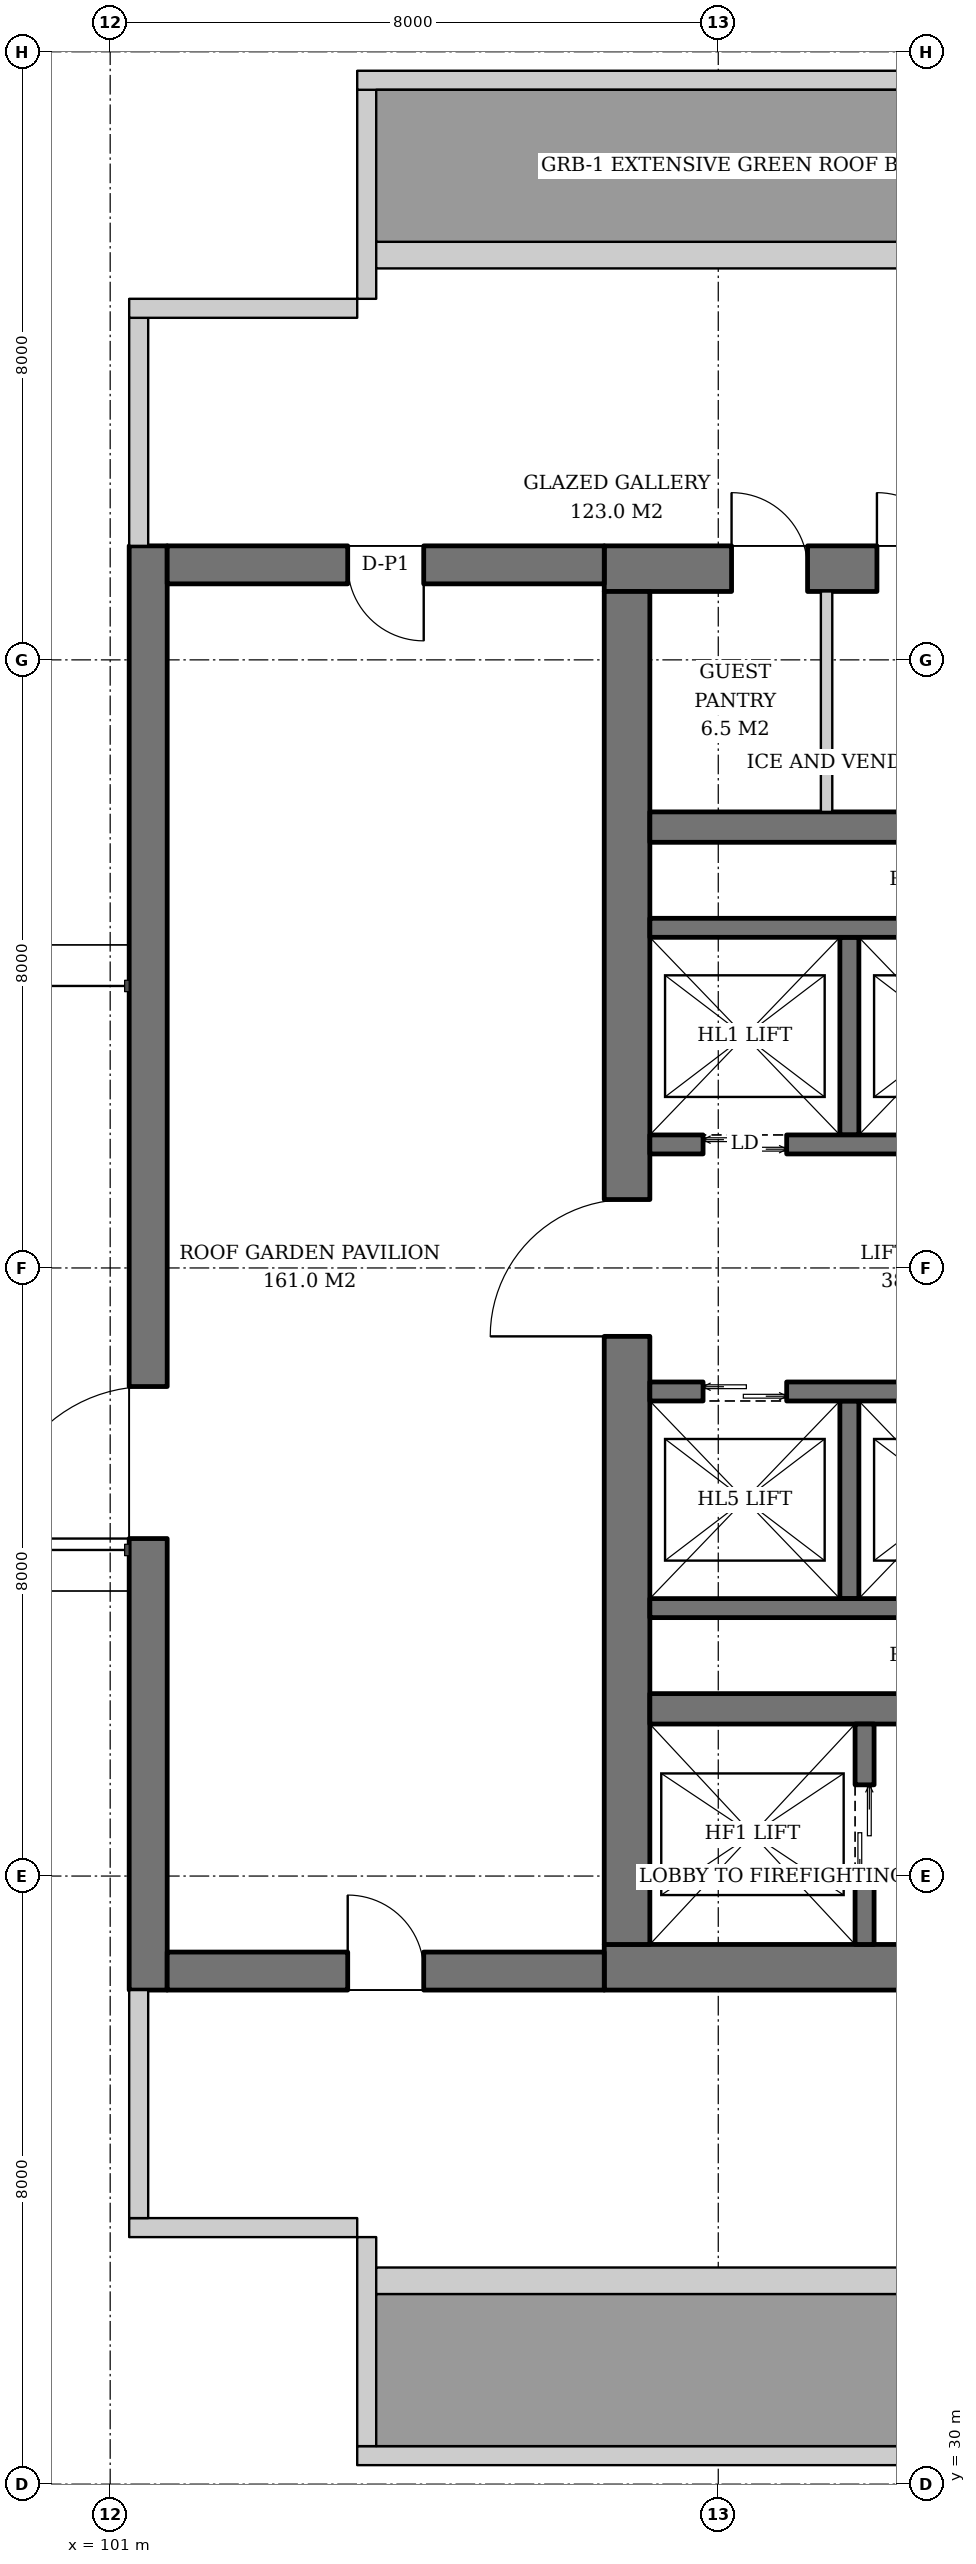
"""IFC4 building model, lengths in metres.
Left out: names, types, materials, properties, quantities, classifications, styles, units other than length and angle.
Written with IfcOpenShell. Run it as: python <this file> out.ifc"""

import sys

from ifc_helpers import new_model, si_unit, direction, frame, frame_2d, origin, place, context, subcontext, project, spatial, rectangle, extrude, element, fill, save


model = new_model("IFC4")
c1 = context("Model", 3, precision=1e-05, world=origin(), true_north=direction((0.0, 1.0)))
c2 = subcontext(c1, "Body", "Model", "MODEL_VIEW")
j1 = project(units=[si_unit("LENGTHUNIT", "METRE"), si_unit("PLANEANGLEUNIT", "RADIAN")], contexts=[c1])
p1 = place(None, origin())
s1 = spatial("IfcSite", under=j1, at=p1, CompositionType="ELEMENT")
p2 = place(p1, origin())
s2 = spatial("IfcBuilding", under=s1, at=p2, CompositionType="ELEMENT")
p3 = place(p2, frame((0.0, 0.0, 131.2)))
s3 = spatial("IfcBuildingStorey", under=s2, at=p3, CompositionType="ELEMENT", Elevation=131.2)
p4 = place(p3, frame((107.5, 36.8, 0.0), z_axis=(0.0, 0.0, 1.0), x_axis=(1.0, 0.0, 0.0)))
e1 = element("IfcWall", 1, at=p4, inside=s3, PredefinedType="SHEAR", context=c2, shape_type="SweptSolid", body=[
    extrude(rectangle(XDim=19.0, YDim=0.6, at=frame_2d((9.5, 0.0))), origin(), (0.0, 0.0, 1.0), 3.8),
])
p5 = place(p4, frame((3.9, 0.0, 0.0)))
e2 = element("IfcOpeningElement", 2, at=p5, cuts=e1, PredefinedType="OPENING", context=c2, shape_type="SweptSolid", body=[
    extrude(rectangle(XDim=1.0, YDim=2.1, at=frame_2d((0.5, 1.05))), frame((0.0, 0.31, 0.0), z_axis=(0.0, -1.0, 0.0), x_axis=(1.0, 0.0, 0.0)), (0.0, 0.0, 1.0), 0.62),
])
p6 = place(p4, frame((15.615, 0.0, 0.0)))
e3 = element("IfcOpeningElement", 3, at=p6, cuts=e1, PredefinedType="OPENING", context=c2, shape_type="SweptSolid", body=[
    extrude(rectangle(XDim=1.0, YDim=2.1, at=frame_2d((0.5, 1.05))), frame((0.0, 0.31, 0.0), z_axis=(0.0, -1.0, 0.0), x_axis=(1.0, 0.0, 0.0)), (0.0, 0.0, 1.0), 0.62),
])
p7 = place(p3, frame((107.5, 55.2, 0.0), z_axis=(0.0, 0.0, 1.0), x_axis=(1.0, 0.0, 0.0)))
e4 = element("IfcWall", 4, at=p7, inside=s3, PredefinedType="SHEAR", context=c2, shape_type="SweptSolid", body=[
    extrude(rectangle(XDim=19.0, YDim=0.6, at=frame_2d((9.5, 0.0))), origin(), (0.0, 0.0, 1.0), 3.8),
])
p8 = place(p7, frame((14.14, 0.0, 0.0)))
e5 = element("IfcOpeningElement", 5, at=p8, cuts=e4, PredefinedType="OPENING", context=c2, shape_type="SweptSolid", body=[
    extrude(rectangle(XDim=1.0, YDim=2.1, at=frame_2d((0.5, 1.05))), frame((0.0, 0.31, 0.0), z_axis=(0.0, -1.0, 0.0), x_axis=(1.0, 0.0, 0.0)), (0.0, 0.0, 1.0), 0.62),
])
p9 = place(p7, frame((1.675, 0.0, 0.0)))
e6 = element("IfcOpeningElement", 6, at=p9, cuts=e4, PredefinedType="OPENING", context=c2, shape_type="SweptSolid", body=[
    extrude(rectangle(XDim=1.0, YDim=2.1, at=frame_2d((0.5, 1.05))), frame((0.0, 0.31, 0.0), z_axis=(0.0, -1.0, 0.0), x_axis=(1.0, 0.0, 0.0)), (0.0, 0.0, 1.0), 0.62),
])
p10 = place(p7, frame((3.587, 0.0, 0.0)))
e7 = element("IfcOpeningElement", 7, at=p10, cuts=e4, PredefinedType="OPENING", context=c2, shape_type="SweptSolid", body=[
    extrude(rectangle(XDim=1.0, YDim=2.1, at=frame_2d((0.5, 1.05))), frame((0.0, 0.31, 0.0), z_axis=(0.0, -1.0, 0.0), x_axis=(1.0, 0.0, 0.0)), (0.0, 0.0, 1.0), 0.62),
])
p11 = place(p3, frame((107.8, 37.1, 0.0), z_axis=(0.0, 0.0, 1.0), x_axis=(0.0, 1.0, 0.0)))
e8 = element("IfcWall", 8, at=p11, inside=s3, PredefinedType="SHEAR", context=c2, shape_type="SweptSolid", body=[
    extrude(rectangle(XDim=17.8, YDim=0.6, at=frame_2d((8.9, 0.0))), origin(), (0.0, 0.0, 1.0), 3.8),
])
p12 = place(p11, frame((8.0, 0.0, 0.0)))
e9 = element("IfcOpeningElement", 9, at=p12, cuts=e8, PredefinedType="OPENING", context=c2, shape_type="SweptSolid", body=[
    extrude(rectangle(XDim=1.8, YDim=2.4, at=frame_2d((0.9, 1.2))), frame((0.0, 0.31, 0.0), z_axis=(0.0, -1.0, 0.0), x_axis=(1.0, 0.0, 0.0)), (0.0, 0.0, 1.0), 0.62),
])
for number, where, z_axis, x_axis in (
    (10, (108.1, 40.2, 0.0), (0.0, 0.0, 1.0), (1.0, 0.0, 0.0)),
    (11, (108.1, 51.8, 0.0), (0.0, 0.0, 1.0), (1.0, 0.0, 0.0)),
):
    element("IfcWall", number, at=place(p3, frame(where, z_axis=z_axis, x_axis=x_axis)), inside=s3, PredefinedType="SHEAR", context=c2, shape_type="SweptSolid", body=[
        extrude(rectangle(XDim=17.8, YDim=0.4, at=frame_2d((8.9, 0.0))), origin(), (0.0, 0.0, 1.0), 3.8),
    ])
p13 = place(p3, frame((101.5, 36.5, 0.0), z_axis=(0.0, 0.0, 1.0), x_axis=(0.0, 1.0, 0.0)))
e12 = element("IfcWall", 12, at=p13, inside=s3, PredefinedType="SOLIDWALL", context=c2, shape_type="SweptSolid", body=[
    extrude(rectangle(XDim=19.0, YDim=0.5, at=frame_2d((9.5, 0.0))), origin(), (0.0, 0.0, 1.0), 3.6),
])
p14 = place(p13, frame((5.94, 0.0, 0.0)))
e13 = element("IfcOpeningElement", 13, at=p14, cuts=e12, PredefinedType="OPENING", context=c2, shape_type="SweptSolid", body=[
    extrude(rectangle(XDim=2.0, YDim=2.4, at=frame_2d((1.0, 1.2))), frame((0.0, 0.26, 0.0), z_axis=(0.0, -1.0, 0.0), x_axis=(1.0, 0.0, 0.0)), (0.0, 0.0, 1.0), 0.52),
])
p15 = place(p3, frame((101.75, 36.75, 0.0), z_axis=(0.0, 0.0, 1.0), x_axis=(1.0, 0.0, 0.0)))
e14 = element("IfcWall", 14, at=p15, inside=s3, PredefinedType="SOLIDWALL", context=c2, shape_type="SweptSolid", body=[
    extrude(rectangle(XDim=5.75, YDim=0.5, at=frame_2d((2.875, 0.0))), origin(), (0.0, 0.0, 1.0), 3.6),
])
p16 = place(p15, frame((2.375, 0.0, 0.0)))
e15 = element("IfcOpeningElement", 15, at=p16, cuts=e14, PredefinedType="OPENING", context=c2, shape_type="SweptSolid", body=[
    extrude(rectangle(XDim=1.0, YDim=2.4, at=frame_2d((0.5, 1.2))), frame((0.0, 0.26, 0.0), z_axis=(0.0, -1.0, 0.0), x_axis=(1.0, 0.0, 0.0)), (0.0, 0.0, 1.0), 0.52),
])
p17 = place(p3, frame((107.5, 55.25, 0.0), z_axis=(0.0, 0.0, 1.0), x_axis=(-1.0, 0.0, 0.0)))
e16 = element("IfcWall", 16, at=p17, inside=s3, PredefinedType="SOLIDWALL", context=c2, shape_type="SweptSolid", body=[
    extrude(rectangle(XDim=5.75, YDim=0.5, at=frame_2d((2.875, 0.0))), origin(), (0.0, 0.0, 1.0), 3.6),
])
p18 = place(p17, frame((2.375, 0.0, 0.0)))
e17 = element("IfcOpeningElement", 17, at=p18, cuts=e16, PredefinedType="OPENING", context=c2, shape_type="SweptSolid", body=[
    extrude(rectangle(XDim=1.0, YDim=2.4, at=frame_2d((0.5, 1.2))), frame((0.0, 0.26, 0.0), z_axis=(0.0, -1.0, 0.0), x_axis=(1.0, 0.0, 0.0)), (0.0, 0.0, 1.0), 0.52),
])
for number, where, z_axis, x_axis in (
    (18, (101.25, 33.375, 0.0), (0.0, 0.0, 1.0), (1.0, 0.0, 0.0)),
    (19, (101.375, 33.5, 0.0), (0.0, 0.0, 1.0), (0.0, 1.0, 0.0)),
    (20, (101.375, 55.5, 0.0), (0.0, 0.0, 1.0), (0.0, 1.0, 0.0)),
    (21, (101.25, 58.625, 0.0), (0.0, 0.0, 1.0), (1.0, 0.0, 0.0)),
):
    element("IfcWall", number, at=place(p3, frame(where, z_axis=z_axis, x_axis=x_axis)), inside=s3, PredefinedType="PARAPET", context=c2, shape_type="SweptSolid", body=[
        extrude(rectangle(XDim=3.0, YDim=0.25, at=frame_2d((1.5, 0.0))), origin(), (0.0, 0.0, 1.0), 1.1),
    ])
p19 = place(p3, frame((104.25, 30.375, 0.0), z_axis=(0.0, 0.0, 1.0), x_axis=(1.0, 0.0, 0.0)))
e22 = element("IfcWall", 22, at=p19, inside=s3, PredefinedType="PARAPET", context=c2, shape_type="SweptSolid", body=[
    extrude(rectangle(XDim=25.5, YDim=0.25, at=frame_2d((12.75, 0.0))), origin(), (0.0, 0.0, 1.0), 1.1),
])
for number, where, z_axis, x_axis in (
    (23, (104.375, 30.5, 0.0), (0.0, 0.0, 1.0), (0.0, 1.0, 0.0)),
    (24, (104.375, 58.75, 0.0), (0.0, 0.0, 1.0), (0.0, 1.0, 0.0)),
):
    element("IfcWall", number, at=place(p3, frame(where, z_axis=z_axis, x_axis=x_axis)), inside=s3, PredefinedType="PARAPET", context=c2, shape_type="SweptSolid", body=[
        extrude(rectangle(XDim=2.75, YDim=0.25, at=frame_2d((1.375, 0.0))), origin(), (0.0, 0.0, 1.0), 1.1),
    ])
p20 = place(p3, frame((104.25, 61.625, 0.0), z_axis=(0.0, 0.0, 1.0), x_axis=(1.0, 0.0, 0.0)))
e25 = element("IfcWall", 25, at=p20, inside=s3, PredefinedType="PARAPET", context=c2, shape_type="SweptSolid", body=[
    extrude(rectangle(XDim=25.5, YDim=0.25, at=frame_2d((12.75, 0.0))), origin(), (0.0, 0.0, 1.0), 1.1),
])
for number, where, z_axis, x_axis in (
    (26, (104.5, 32.675, 0.0), (0.0, 0.0, 1.0), (1.0, 0.0, 0.0)),
    (27, (104.5, 59.325, 0.0), (0.0, 0.0, 1.0), (1.0, 0.0, 0.0)),
):
    element("IfcWall", number, at=place(p3, frame(where, z_axis=z_axis, x_axis=x_axis)), inside=s3, PredefinedType="PARAPET", context=c2, shape_type="SweptSolid", body=[
        extrude(rectangle(XDim=22.0, YDim=0.35, at=frame_2d((11.0, 0.0))), origin(), (0.0, 0.0, 1.0), 1.1),
    ])
p21 = place(p3, frame((110.925, 37.1, 0.0), z_axis=(0.0, 0.0, 1.0), x_axis=(0.0, 1.0, 0.0)))
e28 = element("IfcWall", 28, at=p21, inside=s3, PredefinedType="SHEAR", context=c2, shape_type="SweptSolid", body=[
    extrude(rectangle(XDim=2.9, YDim=0.25, at=frame_2d((1.45, 0.0))), origin(), (0.0, 0.0, 1.0), 3.8),
])
p22 = place(p21, frame((0.8, 0.0, 0.0)))
e29 = element("IfcOpeningElement", 29, at=p22, cuts=e28, PredefinedType="OPENING", context=c2, shape_type="SweptSolid", body=[
    extrude(rectangle(XDim=1.3, YDim=2.2, at=frame_2d((0.65, 1.1))), frame((0.0, 0.135, 0.0), z_axis=(0.0, -1.0, 0.0), x_axis=(1.0, 0.0, 0.0)), (0.0, 0.0, 1.0), 0.27),
])
p23 = place(p3, frame((110.725, 47.75, 0.0), z_axis=(0.0, 0.0, 1.0), x_axis=(0.0, 1.0, 0.0)))
e30 = element("IfcWall", 30, at=p23, inside=s3, PredefinedType="SHEAR", context=c2, shape_type="SweptSolid", body=[
    extrude(rectangle(XDim=2.6, YDim=0.25, at=frame_2d((1.3, 0.0))), origin(), (0.0, 0.0, 1.0), 3.8),
])
p24 = place(p3, frame((108.1, 50.475, 0.0), z_axis=(0.0, 0.0, 1.0), x_axis=(1.0, 0.0, 0.0)))
e31 = element("IfcWall", 31, at=p24, inside=s3, PredefinedType="SHEAR", context=c2, shape_type="SweptSolid", body=[
    extrude(rectangle(XDim=11.0, YDim=0.25, at=frame_2d((5.5, 0.0))), origin(), (0.0, 0.0, 1.0), 3.8),
])
p25 = place(p3, frame((108.1, 47.625, 0.0), z_axis=(0.0, 0.0, 1.0), x_axis=(1.0, 0.0, 0.0)))
e32 = element("IfcWall", 32, at=p25, inside=s3, PredefinedType="SHEAR", context=c2, shape_type="SweptSolid", body=[
    extrude(rectangle(XDim=12.83, YDim=0.25, at=frame_2d((6.415, 0.0))), origin(), (0.0, 0.0, 1.0), 3.8),
])
p26 = place(p25, frame((0.7, 0.0, 0.0)))
e33 = element("IfcOpeningElement", 33, at=p26, cuts=e32, PredefinedType="OPENING", context=c2, shape_type="SweptSolid", body=[
    extrude(rectangle(XDim=1.1, YDim=2.2, at=frame_2d((0.55, 1.1))), frame((0.0, 0.135, 0.0), z_axis=(0.0, -1.0, 0.0), x_axis=(1.0, 0.0, 0.0)), (0.0, 0.0, 1.0), 0.27),
])
p27 = place(p25, frame((3.45, 0.0, 0.0)))
e34 = element("IfcOpeningElement", 34, at=p27, cuts=e32, PredefinedType="OPENING", context=c2, shape_type="SweptSolid", body=[
    extrude(rectangle(XDim=1.1, YDim=2.2, at=frame_2d((0.55, 1.1))), frame((0.0, 0.135, 0.0), z_axis=(0.0, -1.0, 0.0), x_axis=(1.0, 0.0, 0.0)), (0.0, 0.0, 1.0), 0.27),
])
p28 = place(p25, frame((6.2, 0.0, 0.0)))
e35 = element("IfcOpeningElement", 35, at=p28, cuts=e32, PredefinedType="OPENING", context=c2, shape_type="SweptSolid", body=[
    extrude(rectangle(XDim=1.1, YDim=2.2, at=frame_2d((0.55, 1.1))), frame((0.0, 0.135, 0.0), z_axis=(0.0, -1.0, 0.0), x_axis=(1.0, 0.0, 0.0)), (0.0, 0.0, 1.0), 0.27),
])
p29 = place(p25, frame((8.95, 0.0, 0.0)))
e36 = element("IfcOpeningElement", 36, at=p29, cuts=e32, PredefinedType="OPENING", context=c2, shape_type="SweptSolid", body=[
    extrude(rectangle(XDim=1.1, YDim=2.2, at=frame_2d((0.55, 1.1))), frame((0.0, 0.135, 0.0), z_axis=(0.0, -1.0, 0.0), x_axis=(1.0, 0.0, 0.0)), (0.0, 0.0, 1.0), 0.27),
])
p30 = place(p25, frame((11.515, 0.0, 0.0)))
e37 = element("IfcOpeningElement", 37, at=p30, cuts=e32, PredefinedType="OPENING", context=c2, shape_type="SweptSolid", body=[
    extrude(rectangle(XDim=0.8, YDim=2.0, at=frame_2d((0.4, 1.0))), frame((0.0, 0.135, 0.0), z_axis=(0.0, -1.0, 0.0), x_axis=(1.0, 0.0, 0.0)), (0.0, 0.0, 1.0), 0.27),
])
p31 = place(p3, frame((110.725, 44.25, 0.0), z_axis=(0.0, 0.0, 1.0), x_axis=(0.0, -1.0, 0.0)))
e38 = element("IfcWall", 38, at=p31, inside=s3, PredefinedType="SHEAR", context=c2, shape_type="SweptSolid", body=[
    extrude(rectangle(XDim=2.6, YDim=0.25, at=frame_2d((1.3, 0.0))), origin(), (0.0, 0.0, 1.0), 3.8),
])
p32 = place(p3, frame((108.1, 41.525, 0.0), z_axis=(0.0, 0.0, 1.0), x_axis=(1.0, 0.0, 0.0)))
e39 = element("IfcWall", 39, at=p32, inside=s3, PredefinedType="SHEAR", context=c2, shape_type="SweptSolid", body=[
    extrude(rectangle(XDim=11.0, YDim=0.25, at=frame_2d((5.5, 0.0))), origin(), (0.0, 0.0, 1.0), 3.8),
])
p33 = place(p3, frame((108.1, 44.375, 0.0), z_axis=(0.0, 0.0, 1.0), x_axis=(1.0, 0.0, 0.0)))
e40 = element("IfcWall", 40, at=p33, inside=s3, PredefinedType="SHEAR", context=c2, shape_type="SweptSolid", body=[
    extrude(rectangle(XDim=12.83, YDim=0.25, at=frame_2d((6.415, 0.0))), origin(), (0.0, 0.0, 1.0), 3.8),
])
p34 = place(p33, frame((0.7, 0.0, 0.0)))
e41 = element("IfcOpeningElement", 41, at=p34, cuts=e40, PredefinedType="OPENING", context=c2, shape_type="SweptSolid", body=[
    extrude(rectangle(XDim=1.1, YDim=2.2, at=frame_2d((0.55, 1.1))), frame((0.0, 0.135, 0.0), z_axis=(0.0, -1.0, 0.0), x_axis=(1.0, 0.0, 0.0)), (0.0, 0.0, 1.0), 0.27),
])
p35 = place(p33, frame((3.45, 0.0, 0.0)))
e42 = element("IfcOpeningElement", 42, at=p35, cuts=e40, PredefinedType="OPENING", context=c2, shape_type="SweptSolid", body=[
    extrude(rectangle(XDim=1.1, YDim=2.2, at=frame_2d((0.55, 1.1))), frame((0.0, 0.135, 0.0), z_axis=(0.0, -1.0, 0.0), x_axis=(1.0, 0.0, 0.0)), (0.0, 0.0, 1.0), 0.27),
])
p36 = place(p33, frame((6.2, 0.0, 0.0)))
e43 = element("IfcOpeningElement", 43, at=p36, cuts=e40, PredefinedType="OPENING", context=c2, shape_type="SweptSolid", body=[
    extrude(rectangle(XDim=1.1, YDim=2.2, at=frame_2d((0.55, 1.1))), frame((0.0, 0.135, 0.0), z_axis=(0.0, -1.0, 0.0), x_axis=(1.0, 0.0, 0.0)), (0.0, 0.0, 1.0), 0.27),
])
p37 = place(p33, frame((9.0, 0.0, 0.0)))
e44 = element("IfcOpeningElement", 44, at=p37, cuts=e40, PredefinedType="OPENING", context=c2, shape_type="SweptSolid", body=[
    extrude(rectangle(XDim=1.0, YDim=2.1, at=frame_2d((0.5, 1.05))), frame((0.0, 0.135, 0.0), z_axis=(0.0, -1.0, 0.0), x_axis=(1.0, 0.0, 0.0)), (0.0, 0.0, 1.0), 0.27),
])
p38 = place(p33, frame((11.515, 0.0, 0.0)))
e45 = element("IfcOpeningElement", 45, at=p38, cuts=e40, PredefinedType="OPENING", context=c2, shape_type="SweptSolid", body=[
    extrude(rectangle(XDim=0.8, YDim=2.0, at=frame_2d((0.4, 1.0))), frame((0.0, 0.135, 0.0), z_axis=(0.0, -1.0, 0.0), x_axis=(1.0, 0.0, 0.0)), (0.0, 0.0, 1.0), 0.27),
])
p39 = place(p3, frame((110.425, 52.0, 0.0), z_axis=(0.0, 0.0, 1.0), x_axis=(0.0, 1.0, 0.0)))
e46 = element("IfcWall", 46, at=p39, inside=s3, PredefinedType="SOLIDWALL", context=c2, shape_type="SweptSolid", body=[
    extrude(rectangle(XDim=2.9, YDim=0.15, at=frame_2d((1.45, 0.0))), origin(), (0.0, 0.0, 1.0), 3.55),
])
p40 = place(p14, origin())
e47 = element("IfcDoor", 47, at=p40, inside=s3, OperationType="DOUBLE_DOOR_SINGLE_SWING", PredefinedType="DOOR", context=c2, shape_type="SweptSolid", body=[
    extrude(rectangle(XDim=2.0, YDim=2.4, at=frame_2d((1.0, 1.2))), frame((0.0, 0.025, 0.0), z_axis=(0.0, -1.0, 0.0), x_axis=(1.0, 0.0, 0.0)), (0.0, 0.0, 1.0), 0.05),
])
fill(e13, e47)
p41 = place(p16, origin())
e48 = element("IfcDoor", 48, at=p41, inside=s3, OperationType="SINGLE_SWING_LEFT", PredefinedType="DOOR", context=c2, shape_type="SweptSolid", body=[
    extrude(rectangle(XDim=1.0, YDim=2.4, at=frame_2d((0.5, 1.2))), frame((0.0, 0.025, 0.0), z_axis=(0.0, -1.0, 0.0), x_axis=(1.0, 0.0, 0.0)), (0.0, 0.0, 1.0), 0.05),
])
fill(e15, e48)
p42 = place(p18, origin())
e49 = element("IfcDoor", 49, at=p42, inside=s3, OperationType="SINGLE_SWING_LEFT", PredefinedType="DOOR", context=c2, shape_type="SweptSolid", body=[
    extrude(rectangle(XDim=1.0, YDim=2.4, at=frame_2d((0.5, 1.2))), frame((0.0, 0.025, 0.0), z_axis=(0.0, -1.0, 0.0), x_axis=(1.0, 0.0, 0.0)), (0.0, 0.0, 1.0), 0.05),
])
fill(e17, e49)
p43 = place(p22, origin())
e50 = element("IfcDoor", 50, at=p43, inside=s3, OperationType="DOUBLE_DOOR_SLIDING", PredefinedType="DOOR", context=c2, shape_type="SweptSolid", body=[
    extrude(rectangle(XDim=1.3, YDim=2.2, at=frame_2d((0.65, 1.1))), frame((0.0, 0.025, 0.0), z_axis=(0.0, -1.0, 0.0), x_axis=(1.0, 0.0, 0.0)), (0.0, 0.0, 1.0), 0.05),
])
fill(e29, e50)
p44 = place(p26, origin())
e51 = element("IfcDoor", 51, at=p44, inside=s3, OperationType="DOUBLE_DOOR_SLIDING", PredefinedType="DOOR", context=c2, shape_type="SweptSolid", body=[
    extrude(rectangle(XDim=1.1, YDim=2.2, at=frame_2d((0.55, 1.1))), frame((0.0, 0.025, 0.0), z_axis=(0.0, -1.0, 0.0), x_axis=(1.0, 0.0, 0.0)), (0.0, 0.0, 1.0), 0.05),
])
fill(e33, e51)
p45 = place(p34, origin())
e52 = element("IfcDoor", 52, at=p45, inside=s3, OperationType="DOUBLE_DOOR_SLIDING", PredefinedType="DOOR", context=c2, shape_type="SweptSolid", body=[
    extrude(rectangle(XDim=1.1, YDim=2.2, at=frame_2d((0.55, 1.1))), frame((0.0, 0.025, 0.0), z_axis=(0.0, -1.0, 0.0), x_axis=(1.0, 0.0, 0.0)), (0.0, 0.0, 1.0), 0.05),
])
fill(e41, e52)
p46 = place(p12, origin())
e53 = element("IfcDoor", 53, at=p46, inside=s3, OperationType="DOUBLE_DOOR_SINGLE_SWING", PredefinedType="DOOR", context=c2, shape_type="SweptSolid", body=[
    extrude(rectangle(XDim=1.8, YDim=2.4, at=frame_2d((0.9, 1.2))), frame((0.0, 0.025, 0.0), z_axis=(0.0, -1.0, 0.0), x_axis=(1.0, 0.0, 0.0)), (0.0, 0.0, 1.0), 0.05),
])
fill(e9, e53)
p47 = place(p9, origin())
e54 = element("IfcDoor", 54, at=p47, inside=s3, OperationType="SINGLE_SWING_LEFT", PredefinedType="DOOR", context=c2, shape_type="SweptSolid", body=[
    extrude(rectangle(XDim=1.0, YDim=2.1, at=frame_2d((0.5, 1.05))), frame((0.0, -0.24, 0.0), z_axis=(0.0, -1.0, 0.0), x_axis=(1.0, 0.0, 0.0)), (0.0, 0.0, 1.0), 0.05),
])
fill(e6, e54)
p48 = place(p10, origin())
e55 = element("IfcDoor", 55, at=p48, inside=s3, OperationType="SINGLE_SWING_LEFT", PredefinedType="DOOR", context=c2, shape_type="SweptSolid", body=[
    extrude(rectangle(XDim=1.0, YDim=2.1, at=frame_2d((0.5, 1.05))), frame((0.0, -0.24, 0.0), z_axis=(0.0, -1.0, 0.0), x_axis=(1.0, 0.0, 0.0)), (0.0, 0.0, 1.0), 0.05),
])
fill(e7, e55)
save(model, sys.argv[1])
